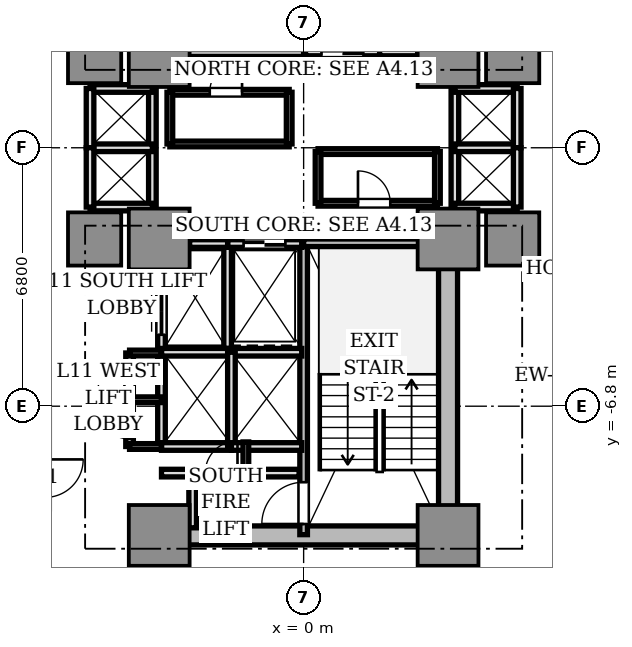
"""IFC4 building model, lengths in metres.
Left out: names, types, materials, properties, quantities, classifications, styles, units other than length and angle.
Written with IfcOpenShell. Run it as: python <this file> out.ifc"""

import sys

from ifc_helpers import new_model, si_unit, direction, frame, frame_2d, origin, origin_2d, place, context, subcontext, project, spatial, rectangle, extrude, source, transform, mapped, element, fill, save


model = new_model("IFC4")
c1 = context("Model", 3, precision=1e-05, world=origin(), true_north=direction((0.0, 1.0)))
c2 = subcontext(c1, "Body", "Model", "MODEL_VIEW")
j1 = project(units=[si_unit("LENGTHUNIT", "METRE"), si_unit("PLANEANGLEUNIT", "RADIAN")], contexts=[c1])
p1 = place(None, origin())
s1 = spatial("IfcSite", under=j1, at=p1, CompositionType="ELEMENT")
p2 = place(p1, origin())
s2 = spatial("IfcBuilding", under=s1, at=p2, CompositionType="ELEMENT")
p3 = place(p2, frame((0.0, 0.0, 43.2)))
s3 = spatial("IfcBuildingStorey", under=s2, at=p3, CompositionType="ELEMENT", Elevation=43.2)
p4 = place(p3, frame((-3.55, -10.2, 0.0), z_axis=(0.0, 0.0, 1.0), x_axis=(1.0, 0.0, 0.0)))
e1 = element("IfcWall", 1, at=p4, inside=s3, PredefinedType="SHEAR", context=c2, shape_type="SweptSolid", body=[
    extrude(rectangle(XDim=7.1, YDim=0.5, at=frame_2d((3.55, 0.0))), origin(), (0.0, 0.0, 1.0), 3.05),
])
p5 = place(p3, frame((3.8, -9.75, 0.0), z_axis=(0.0, 0.0, 1.0), x_axis=(0.0, 1.0, 0.0)))
e2 = element("IfcWall", 2, at=p5, inside=s3, PredefinedType="SHEAR", context=c2, shape_type="SweptSolid", body=[
    extrude(rectangle(XDim=6.9, YDim=0.5, at=frame_2d((3.45, 0.0))), origin(), (0.0, 0.0, 1.0), 3.05),
])
m1 = source(origin(), c2, "Body", "SweptSolid", [
    extrude(rectangle(XDim=1.6, YDim=1.6, at=origin_2d()), origin(), (0.0, 0.0, 1.0), 3.05),
])
for number, where, z_axis, x_axis in (
    (3, (-3.8, 2.4, 0.0), (0.0, 0.0, 1.0), (1.0, 0.0, 0.0)),
    (4, (3.8, 2.4, 0.0), (0.0, 0.0, 1.0), (1.0, 0.0, 0.0)),
    (5, (-3.8, -2.4, 0.0), (0.0, 0.0, 1.0), (1.0, 0.0, 0.0)),
    (6, (3.8, -2.4, 0.0), (0.0, 0.0, 1.0), (1.0, 0.0, 0.0)),
    (7, (-3.8, -10.2, 0.0), (0.0, 0.0, 1.0), (1.0, 0.0, 0.0)),
    (8, (3.8, -10.2, 0.0), (0.0, 0.0, 1.0), (1.0, 0.0, 0.0)),
):
    element("IfcColumn", number, at=place(p3, frame(where, z_axis=z_axis, x_axis=x_axis)), inside=s3, PredefinedType="COLUMN", context=c2, shape_type="MappedRepresentation", body=[
        mapped(m1, transform((0.0, 0.0, 0.0), scale=1.0)),
    ])
m2 = source(origin(), c2, "Body", "SweptSolid", [
    extrude(rectangle(XDim=1.4, YDim=1.4, at=origin_2d()), origin(), (0.0, 0.0, 1.0), 3.05),
])
for number, where, z_axis, x_axis in (
    (9, (5.5, 2.4, 0.0), (0.0, 0.0, 1.0), (1.0, 0.0, 0.0)),
    (10, (-5.5, 2.4, 0.0), (0.0, 0.0, 1.0), (1.0, 0.0, 0.0)),
    (11, (5.5, -2.4, 0.0), (0.0, 0.0, 1.0), (1.0, 0.0, 0.0)),
    (12, (-5.5, -2.4, 0.0), (0.0, 0.0, 1.0), (1.0, 0.0, 0.0)),
):
    element("IfcColumn", number, at=place(p3, frame(where, z_axis=z_axis, x_axis=x_axis)), inside=s3, PredefinedType="COLUMN", context=c2, shape_type="MappedRepresentation", body=[
        mapped(m2, transform((0.0, 0.0, 0.0), scale=1.0)),
    ])
p6 = place(p3, frame((0.0, 2.5, 0.0), z_axis=(0.0, 0.0, 1.0), x_axis=(0.0, 1.0, 0.0)))
e13 = element("IfcWall", 13, at=p6, inside=s3, PredefinedType="SOLIDWALL", context=c2, shape_type="SweptSolid", body=[
    extrude(rectangle(XDim=7.68, YDim=0.2, at=frame_2d((3.84, 0.0))), origin(), (0.0, 0.0, 1.0), 3.05),
])
p7 = place(p6, frame((6.5, 0.0, 0.0)))
e14 = element("IfcOpeningElement", 14, at=p7, cuts=e13, PredefinedType="OPENING", context=c2, shape_type="SweptSolid", body=[
    extrude(rectangle(XDim=0.95, YDim=2.15, at=frame_2d((0.475, 1.075))), frame((0.0, 0.11, 0.0), z_axis=(0.0, -1.0, 0.0), x_axis=(1.0, 0.0, 0.0)), (0.0, 0.0, 1.0), 0.22),
])
p8 = place(p3, frame((-3.72, 2.5, 0.0), z_axis=(0.0, 0.0, 1.0), x_axis=(1.0, 0.0, 0.0)))
e15 = element("IfcWall", 15, at=p8, inside=s3, PredefinedType="SOLIDWALL", context=c2, shape_type="SweptSolid", body=[
    extrude(rectangle(XDim=3.72, YDim=0.2, at=frame_2d((1.86, 0.0))), origin(), (0.0, 0.0, 1.0), 3.05),
])
p9 = place(p3, frame((0.0, -10.18, 0.0), z_axis=(0.0, 0.0, 1.0), x_axis=(0.0, 1.0, 0.0)))
e16 = element("IfcWall", 16, at=p9, inside=s3, PredefinedType="SOLIDWALL", context=c2, shape_type="SweptSolid", body=[
    extrude(rectangle(XDim=7.68, YDim=0.2, at=frame_2d((3.84, 0.0))), origin(), (0.0, 0.0, 1.0), 3.05),
])
p10 = place(p9, frame((0.28, 0.0, 0.0)))
e17 = element("IfcOpeningElement", 17, at=p10, cuts=e16, PredefinedType="OPENING", context=c2, shape_type="SweptSolid", body=[
    extrude(rectangle(XDim=1.1, YDim=2.15, at=frame_2d((0.55, 1.075))), frame((0.0, 0.11, 0.0), z_axis=(0.0, -1.0, 0.0), x_axis=(1.0, 0.0, 0.0)), (0.0, 0.0, 1.0), 0.22),
])
p11 = place(p3, frame((0.0, -2.5, 0.0), z_axis=(0.0, 0.0, 1.0), x_axis=(1.0, 0.0, 0.0)))
e18 = element("IfcWall", 18, at=p11, inside=s3, PredefinedType="SOLIDWALL", context=c2, shape_type="SweptSolid", body=[
    extrude(rectangle(XDim=3.72, YDim=0.2, at=frame_2d((1.86, 0.0))), origin(), (0.0, 0.0, 1.0), 3.05),
])
p12 = place(p3, frame((2.0, 2.5, 0.0), z_axis=(0.0, 0.0, 1.0), x_axis=(0.0, 1.0, 0.0)))
e19 = element("IfcWall", 19, at=p12, inside=s3, PredefinedType="SOLIDWALL", context=c2, shape_type="SweptSolid", body=[
    extrude(rectangle(XDim=2.78, YDim=0.2, at=frame_2d((1.39, 0.0))), origin(), (0.0, 0.0, 1.0), 2.6),
])
p13 = place(p3, frame((0.05, 2.52, 0.0), z_axis=(0.0, 0.0, 1.0), x_axis=(1.0, 0.0, 0.0)))
e20 = element("IfcWall", 20, at=p13, inside=s3, PredefinedType="SOLIDWALL", context=c2, shape_type="SweptSolid", body=[
    extrude(rectangle(XDim=1.95, YDim=0.2, at=frame_2d((0.975, 0.0))), origin(), (0.0, 0.0, 1.0), 2.6),
])
p14 = place(p13, frame((0.42, 0.0, 0.0)))
e21 = element("IfcOpeningElement", 21, at=p14, cuts=e20, PredefinedType="OPENING", context=c2, shape_type="SweptSolid", body=[
    extrude(rectangle(XDim=1.1, YDim=2.2, at=frame_2d((0.55, 1.1))), frame((0.0, 0.11, 0.0), z_axis=(0.0, -1.0, 0.0), x_axis=(1.0, 0.0, 0.0)), (0.0, 0.0, 1.0), 0.22),
])
p15 = place(p3, frame((-2.0, -5.28, 0.0), z_axis=(0.0, 0.0, 1.0), x_axis=(0.0, 1.0, 0.0)))
e22 = element("IfcWall", 22, at=p15, inside=s3, PredefinedType="SOLIDWALL", context=c2, shape_type="SweptSolid", body=[
    extrude(rectangle(XDim=2.78, YDim=0.2, at=frame_2d((1.39, 0.0))), origin(), (0.0, 0.0, 1.0), 2.6),
])
p16 = place(p3, frame((-2.0, -2.52, 0.0), z_axis=(0.0, 0.0, 1.0), x_axis=(1.0, 0.0, 0.0)))
e23 = element("IfcWall", 23, at=p16, inside=s3, PredefinedType="SOLIDWALL", context=c2, shape_type="SweptSolid", body=[
    extrude(rectangle(XDim=1.95, YDim=0.2, at=frame_2d((0.975, 0.0))), origin(), (0.0, 0.0, 1.0), 2.6),
])
p17 = place(p16, frame((0.42, 0.0, 0.0)))
e24 = element("IfcOpeningElement", 24, at=p17, cuts=e23, PredefinedType="OPENING", context=c2, shape_type="SweptSolid", body=[
    extrude(rectangle(XDim=1.1, YDim=2.2, at=frame_2d((0.55, 1.1))), frame((0.0, 0.11, 0.0), z_axis=(0.0, -1.0, 0.0), x_axis=(1.0, 0.0, 0.0)), (0.0, 0.0, 1.0), 0.22),
])
for number, where, z_axis, x_axis in (
    (25, (2.0, 2.52, 0.0), (0.0, 0.0, 1.0), (1.0, 0.0, 0.0)),
    (26, (-3.0, -2.52, 0.0), (0.0, 0.0, 1.0), (1.0, 0.0, 0.0)),
):
    element("IfcWall", number, at=place(p3, frame(where, z_axis=z_axis, x_axis=x_axis)), inside=s3, PredefinedType="SOLIDWALL", context=c2, shape_type="SweptSolid", body=[
        extrude(rectangle(XDim=1.0, YDim=0.2, at=frame_2d((0.5, 0.0))), origin(), (0.0, 0.0, 1.0), 2.6),
    ])
p18 = place(p3, frame((-3.74, -5.36, 0.0), z_axis=(0.0, 0.0, 1.0), x_axis=(0.0, 1.0, 0.0)))
e27 = element("IfcWall", 27, at=p18, inside=s3, PredefinedType="SOLIDWALL", context=c2, shape_type="SweptSolid", body=[
    extrude(rectangle(XDim=2.08, YDim=0.2, at=frame_2d((1.04, 0.0))), origin(), (0.0, 0.0, 1.0), 2.6),
])
p19 = place(p18, frame((0.44, 0.0, 0.0)))
e28 = element("IfcOpeningElement", 28, at=p19, cuts=e27, PredefinedType="OPENING", context=c2, shape_type="SweptSolid", body=[
    extrude(rectangle(XDim=1.2, YDim=2.2, at=frame_2d((0.6, 1.1))), frame((0.0, 0.11, 0.0), z_axis=(0.0, -1.0, 0.0), x_axis=(1.0, 0.0, 0.0)), (0.0, 0.0, 1.0), 0.22),
])
p20 = place(p3, frame((-3.74, -7.86, 0.0), z_axis=(0.0, 0.0, 1.0), x_axis=(0.0, 1.0, 0.0)))
e29 = element("IfcWall", 29, at=p20, inside=s3, PredefinedType="SOLIDWALL", context=c2, shape_type="SweptSolid", body=[
    extrude(rectangle(XDim=2.48, YDim=0.2, at=frame_2d((1.24, 0.0))), origin(), (0.0, 0.0, 1.0), 2.6),
])
p21 = place(p3, frame((-3.74, -7.86, 0.0), z_axis=(0.0, 0.0, 1.0), x_axis=(1.0, 0.0, 0.0)))
e30 = element("IfcWall", 30, at=p21, inside=s3, PredefinedType="SOLIDWALL", context=c2, shape_type="SweptSolid", body=[
    extrude(rectangle(XDim=1.84, YDim=0.2, at=frame_2d((0.92, 0.0))), origin(), (0.0, 0.0, 1.0), 2.6),
])
p22 = place(p3, frame((-3.74, -5.38, 0.0), z_axis=(0.0, 0.0, 1.0), x_axis=(1.0, 0.0, 0.0)))
e31 = element("IfcWall", 31, at=p22, inside=s3, PredefinedType="SOLIDWALL", context=c2, shape_type="SweptSolid", body=[
    extrude(rectangle(XDim=3.69, YDim=0.2, at=frame_2d((1.845, 0.0))), origin(), (0.0, 0.0, 1.0), 2.6),
])
p23 = place(p3, frame((-1.9, -7.86, 0.0), z_axis=(0.0, 0.0, 1.0), x_axis=(0.0, 1.0, 0.0)))
e32 = element("IfcWall", 32, at=p23, inside=s3, PredefinedType="SOLIDWALL", context=c2, shape_type="SweptSolid", body=[
    extrude(rectangle(XDim=2.48, YDim=0.2, at=frame_2d((1.24, 0.0))), origin(), (0.0, 0.0, 1.0), 2.6),
])
p24 = place(p3, frame((-1.9, -7.86, 0.0), z_axis=(0.0, 0.0, 1.0), x_axis=(1.0, 0.0, 0.0)))
e33 = element("IfcWall", 33, at=p24, inside=s3, PredefinedType="SOLIDWALL", context=c2, shape_type="SweptSolid", body=[
    extrude(rectangle(XDim=1.85, YDim=0.2, at=frame_2d((0.925, 0.0))), origin(), (0.0, 0.0, 1.0), 2.6),
])
p25 = place(p3, frame((3.98, -1.56, 0.0), z_axis=(0.0, 0.0, 1.0), x_axis=(0.0, 1.0, 0.0)))
e34 = element("IfcWall", 34, at=p25, inside=s3, PredefinedType="SOLIDWALL", context=c2, shape_type="SweptSolid", body=[
    extrude(rectangle(XDim=3.12, YDim=0.2, at=frame_2d((1.56, 0.0))), origin(), (0.0, 0.0, 1.0), 2.12),
])
for number, where, z_axis, x_axis in (
    (35, (3.98, 1.56, 0.0), (0.0, 0.0, 1.0), (1.0, 0.0, 0.0)),
    (36, (3.98, -1.56, 0.0), (0.0, 0.0, 1.0), (1.0, 0.0, 0.0)),
    (37, (3.98, 0.0, 0.0), (0.0, 0.0, 1.0), (1.0, 0.0, 0.0)),
):
    element("IfcWall", number, at=place(p3, frame(where, z_axis=z_axis, x_axis=x_axis)), inside=s3, PredefinedType="SOLIDWALL", context=c2, shape_type="SweptSolid", body=[
        extrude(rectangle(XDim=1.64, YDim=0.2, at=frame_2d((0.82, 0.0))), origin(), (0.0, 0.0, 1.0), 2.6),
    ])
for number, where, z_axis, x_axis in (
    (38, (5.62, 0.0, 0.0), (0.0, 0.0, 1.0), (0.0, 1.0, 0.0)),
    (39, (5.62, -1.56, 0.0), (0.0, 0.0, 1.0), (0.0, 1.0, 0.0)),
):
    element("IfcWall", number, at=place(p3, frame(where, z_axis=z_axis, x_axis=x_axis)), inside=s3, PredefinedType="SOLIDWALL", context=c2, shape_type="SweptSolid", body=[
        extrude(rectangle(XDim=1.56, YDim=0.2, at=frame_2d((0.78, 0.0))), origin(), (0.0, 0.0, 1.0), 2.6),
    ])
p26 = place(p3, frame((-3.98, -1.56, 0.0), z_axis=(0.0, 0.0, 1.0), x_axis=(0.0, 1.0, 0.0)))
e40 = element("IfcWall", 40, at=p26, inside=s3, PredefinedType="SOLIDWALL", context=c2, shape_type="SweptSolid", body=[
    extrude(rectangle(XDim=3.12, YDim=0.2, at=frame_2d((1.56, 0.0))), origin(), (0.0, 0.0, 1.0), 2.12),
])
for number, where, z_axis, x_axis in (
    (41, (-5.62, 1.56, 0.0), (0.0, 0.0, 1.0), (1.0, 0.0, 0.0)),
    (42, (-5.62, -1.56, 0.0), (0.0, 0.0, 1.0), (1.0, 0.0, 0.0)),
    (43, (-5.62, 0.0, 0.0), (0.0, 0.0, 1.0), (1.0, 0.0, 0.0)),
):
    element("IfcWall", number, at=place(p3, frame(where, z_axis=z_axis, x_axis=x_axis)), inside=s3, PredefinedType="SOLIDWALL", context=c2, shape_type="SweptSolid", body=[
        extrude(rectangle(XDim=1.64, YDim=0.2, at=frame_2d((0.82, 0.0))), origin(), (0.0, 0.0, 1.0), 2.6),
    ])
for number, where, z_axis, x_axis in (
    (44, (-5.62, 0.0, 0.0), (0.0, 0.0, 1.0), (0.0, 1.0, 0.0)),
    (45, (-5.62, -1.56, 0.0), (0.0, 0.0, 1.0), (0.0, 1.0, 0.0)),
):
    element("IfcWall", number, at=place(p3, frame(where, z_axis=z_axis, x_axis=x_axis)), inside=s3, PredefinedType="SOLIDWALL", context=c2, shape_type="SweptSolid", body=[
        extrude(rectangle(XDim=1.56, YDim=0.2, at=frame_2d((0.78, 0.0))), origin(), (0.0, 0.0, 1.0), 2.6),
    ])
p27 = place(p3, frame((-3.74, -8.56, 0.0), z_axis=(0.0, 0.0, 1.0), x_axis=(1.0, 0.0, 0.0)))
e46 = element("IfcWall", 46, at=p27, inside=s3, PredefinedType="SOLIDWALL", context=c2, shape_type="SweptSolid", body=[
    extrude(rectangle(XDim=3.62, YDim=0.2, at=frame_2d((1.81, 0.0))), origin(), (0.0, 0.0, 1.0), 2.6),
])
p28 = place(p27, frame((1.15, 0.0, 0.0)))
e47 = element("IfcOpeningElement", 47, at=p28, cuts=e46, PredefinedType="OPENING", context=c2, shape_type="SweptSolid", body=[
    extrude(rectangle(XDim=0.85, YDim=2.1, at=frame_2d((0.425, 1.05))), frame((0.0, 0.11, 0.0), z_axis=(0.0, -1.0, 0.0), x_axis=(1.0, 0.0, 0.0)), (0.0, 0.0, 1.0), 0.22),
])
p29 = place(p3, frame((-2.92, -10.0, 0.0), z_axis=(0.0, 0.0, 1.0), x_axis=(0.0, 1.0, 0.0)))
e48 = element("IfcWall", 48, at=p29, inside=s3, PredefinedType="SOLIDWALL", context=c2, shape_type="SweptSolid", body=[
    extrude(rectangle(XDim=1.44, YDim=0.2, at=frame_2d((0.72, 0.0))), origin(), (0.0, 0.0, 1.0), 2.6),
])
p30 = place(p3, frame((-1.52, -8.56, 0.0), z_axis=(0.0, 0.0, 1.0), x_axis=(0.0, 1.0, 0.0)))
e49 = element("IfcWall", 49, at=p30, inside=s3, PredefinedType="PARTITIONING", context=c2, shape_type="SweptSolid", body=[
    extrude(rectangle(XDim=0.82, YDim=0.15, at=frame_2d((0.41, 0.0))), origin(), (0.0, 0.0, 1.0), 2.6),
])
p31 = place(p3, frame((-4.58, -7.86, 0.0), z_axis=(0.0, 0.0, 1.0), x_axis=(0.0, 1.0, 0.0)))
e50 = element("IfcWall", 50, at=p31, inside=s3, PredefinedType="SOLIDWALL", context=c2, shape_type="SweptSolid", body=[
    extrude(rectangle(XDim=2.46, YDim=0.2, at=frame_2d((1.23, 0.0))), origin(), (0.0, 0.0, 1.0), 2.6),
])
p32 = place(p31, frame((0.2, 0.0, 0.0)))
e51 = element("IfcOpeningElement", 51, at=p32, cuts=e50, PredefinedType="OPENING", context=c2, shape_type="SweptSolid", body=[
    extrude(rectangle(XDim=0.85, YDim=2.1, at=frame_2d((0.425, 1.05))), frame((0.0, 0.11, 0.0), z_axis=(0.0, -1.0, 0.0), x_axis=(1.0, 0.0, 0.0)), (0.0, 0.0, 1.0), 0.22),
])
p33 = place(p31, frame((1.38, 0.0, 0.0)))
e52 = element("IfcOpeningElement", 52, at=p33, cuts=e50, PredefinedType="OPENING", context=c2, shape_type="SweptSolid", body=[
    extrude(rectangle(XDim=0.85, YDim=2.1, at=frame_2d((0.425, 1.05))), frame((0.0, 0.11, 0.0), z_axis=(0.0, -1.0, 0.0), x_axis=(1.0, 0.0, 0.0)), (0.0, 0.0, 1.0), 0.22),
])
for number, where, z_axis, x_axis in (
    (53, (-4.58, -5.4, 0.0), (0.0, 0.0, 1.0), (1.0, 0.0, 0.0)),
    (54, (-4.58, -7.86, 0.0), (0.0, 0.0, 1.0), (1.0, 0.0, 0.0)),
    (55, (-4.58, -6.63, 0.0), (0.0, 0.0, 1.0), (1.0, 0.0, 0.0)),
):
    element("IfcWall", number, at=place(p3, frame(where, z_axis=z_axis, x_axis=x_axis)), inside=s3, PredefinedType="PARTITIONING", context=c2, shape_type="SweptSolid", body=[
        extrude(rectangle(XDim=0.84, YDim=0.15, at=frame_2d((0.42, 0.0))), origin(), (0.0, 0.0, 1.0), 2.6),
    ])
p34 = place(p3, frame((-3.52, 0.1, 0.0), z_axis=(0.0, 0.0, 1.0), x_axis=(1.0, 0.0, 0.0)))
e56 = element("IfcWall", 56, at=p34, inside=s3, PredefinedType="PARTITIONING", context=c2, shape_type="SweptSolid", body=[
    extrude(rectangle(XDim=3.14, YDim=0.15, at=frame_2d((1.57, 0.0))), origin(), (0.0, 0.0, 1.0), 2.6),
])
p35 = place(p3, frame((-3.52, 1.46, 0.0), z_axis=(0.0, 0.0, 1.0), x_axis=(1.0, 0.0, 0.0)))
e57 = element("IfcWall", 57, at=p35, inside=s3, PredefinedType="PARTITIONING", context=c2, shape_type="SweptSolid", body=[
    extrude(rectangle(XDim=3.14, YDim=0.15, at=frame_2d((1.57, 0.0))), origin(), (0.0, 0.0, 1.0), 2.6),
])
p36 = place(p35, frame((1.05, 0.0, 0.0)))
e58 = element("IfcOpeningElement", 58, at=p36, cuts=e57, PredefinedType="OPENING", context=c2, shape_type="SweptSolid", body=[
    extrude(rectangle(XDim=0.85, YDim=2.1, at=frame_2d((0.425, 1.05))), frame((0.0, 0.085, 0.0), z_axis=(0.0, -1.0, 0.0), x_axis=(1.0, 0.0, 0.0)), (0.0, 0.0, 1.0), 0.17),
])
p37 = place(p3, frame((-3.52, 0.1, 0.0), z_axis=(0.0, 0.0, 1.0), x_axis=(0.0, 1.0, 0.0)))
e59 = element("IfcWall", 59, at=p37, inside=s3, PredefinedType="PARTITIONING", context=c2, shape_type="SweptSolid", body=[
    extrude(rectangle(XDim=1.36, YDim=0.15, at=frame_2d((0.68, 0.0))), origin(), (0.0, 0.0, 1.0), 2.12),
])
p38 = place(p3, frame((-0.38, 0.1, 0.0), z_axis=(0.0, 0.0, 1.0), x_axis=(0.0, 1.0, 0.0)))
e60 = element("IfcWall", 60, at=p38, inside=s3, PredefinedType="PARTITIONING", context=c2, shape_type="SweptSolid", body=[
    extrude(rectangle(XDim=1.36, YDim=0.15, at=frame_2d((0.68, 0.0))), origin(), (0.0, 0.0, 1.0), 2.6),
])
p39 = place(p3, frame((0.38, -0.1, 0.0), z_axis=(0.0, 0.0, 1.0), x_axis=(1.0, 0.0, 0.0)))
e61 = element("IfcWall", 61, at=p39, inside=s3, PredefinedType="PARTITIONING", context=c2, shape_type="SweptSolid", body=[
    extrude(rectangle(XDim=3.14, YDim=0.15, at=frame_2d((1.57, 0.0))), origin(), (0.0, 0.0, 1.0), 2.6),
])
p40 = place(p3, frame((0.38, -1.46, 0.0), z_axis=(0.0, 0.0, 1.0), x_axis=(1.0, 0.0, 0.0)))
e62 = element("IfcWall", 62, at=p40, inside=s3, PredefinedType="PARTITIONING", context=c2, shape_type="SweptSolid", body=[
    extrude(rectangle(XDim=3.14, YDim=0.15, at=frame_2d((1.57, 0.0))), origin(), (0.0, 0.0, 1.0), 2.6),
])
p41 = place(p40, frame((1.05, 0.0, 0.0)))
e63 = element("IfcOpeningElement", 63, at=p41, cuts=e62, PredefinedType="OPENING", context=c2, shape_type="SweptSolid", body=[
    extrude(rectangle(XDim=0.85, YDim=2.1, at=frame_2d((0.425, 1.05))), frame((0.0, 0.085, 0.0), z_axis=(0.0, -1.0, 0.0), x_axis=(1.0, 0.0, 0.0)), (0.0, 0.0, 1.0), 0.17),
])
p42 = place(p3, frame((0.38, -1.46, 0.0), z_axis=(0.0, 0.0, 1.0), x_axis=(0.0, 1.0, 0.0)))
e64 = element("IfcWall", 64, at=p42, inside=s3, PredefinedType="PARTITIONING", context=c2, shape_type="SweptSolid", body=[
    extrude(rectangle(XDim=1.36, YDim=0.15, at=frame_2d((0.68, 0.0))), origin(), (0.0, 0.0, 1.0), 2.6),
])
p43 = place(p3, frame((3.52, -1.46, 0.0), z_axis=(0.0, 0.0, 1.0), x_axis=(0.0, 1.0, 0.0)))
e65 = element("IfcWall", 65, at=p43, inside=s3, PredefinedType="PARTITIONING", context=c2, shape_type="SweptSolid", body=[
    extrude(rectangle(XDim=1.36, YDim=0.15, at=frame_2d((0.68, 0.0))), origin(), (0.0, 0.0, 1.0), 2.12),
])
m3 = source(origin(), c2, "Body", "SweptSolid", [
    extrude(rectangle(XDim=1.1, YDim=0.05, at=origin_2d()), origin(), (0.0, 0.0, 1.0), 2.2),
])
p44 = place(p14, frame((0.55, 0.0, 0.0)))
e66 = element("IfcDoor", 66, at=p44, inside=s3, OperationType="DOUBLE_DOOR_SLIDING", PredefinedType="DOOR", context=c2, shape_type="MappedRepresentation", body=[
    mapped(m3, transform((0.0, 0.0, 0.0), scale=1.0)),
])
fill(e21, e66)
p45 = place(p17, frame((0.55, 0.0, 0.0)))
e67 = element("IfcDoor", 67, at=p45, inside=s3, OperationType="DOUBLE_DOOR_SLIDING", PredefinedType="DOOR", context=c2, shape_type="MappedRepresentation", body=[
    mapped(m3, transform((0.0, 0.0, 0.0), scale=1.0)),
])
fill(e24, e67)
m4 = source(origin(), c2, "Body", "SweptSolid", [
    extrude(rectangle(XDim=1.2, YDim=0.05, at=origin_2d()), origin(), (0.0, 0.0, 1.0), 2.2),
])
p46 = place(p19, frame((0.6, 0.0, 0.0)))
e68 = element("IfcDoor", 68, at=p46, inside=s3, OperationType="DOUBLE_DOOR_SLIDING", PredefinedType="DOOR", context=c2, shape_type="MappedRepresentation", body=[
    mapped(m4, transform((0.0, 0.0, 0.0), scale=1.0)),
])
fill(e28, e68)
m5 = source(origin(), c2, "Body", "SweptSolid", [
    extrude(rectangle(XDim=1.1, YDim=0.05, at=origin_2d()), origin(), (0.0, 0.0, 1.0), 2.15),
])
p47 = place(p10, frame((0.55, 0.0, 0.0)))
e69 = element("IfcDoor", 69, at=p47, inside=s3, OperationType="SINGLE_SWING_LEFT", PredefinedType="DOOR", context=c2, shape_type="MappedRepresentation", body=[
    mapped(m5, transform((0.0, 0.0, 0.0), scale=1.0)),
])
fill(e17, e69)
m6 = source(origin(), c2, "Body", "SweptSolid", [
    extrude(rectangle(XDim=0.85, YDim=0.05, at=origin_2d()), origin(), (0.0, 0.0, 1.0), 2.1),
])
p48 = place(p28, frame((0.425, 0.0, 0.0)))
e70 = element("IfcDoor", 70, at=p48, inside=s3, OperationType="SINGLE_SWING_RIGHT", PredefinedType="DOOR", context=c2, shape_type="MappedRepresentation", body=[
    mapped(m6, transform((0.0, 0.0, 0.0), scale=1.0)),
])
fill(e47, e70)
p49 = place(p32, frame((0.425, 0.0, 0.0)))
e71 = element("IfcDoor", 71, at=p49, inside=s3, OperationType="SINGLE_SWING_RIGHT", PredefinedType="DOOR", context=c2, shape_type="MappedRepresentation", body=[
    mapped(m6, transform((0.0, 0.0, 0.0), scale=1.0)),
])
fill(e51, e71)
p50 = place(p33, frame((0.425, 0.0, 0.0)))
e72 = element("IfcDoor", 72, at=p50, inside=s3, OperationType="SINGLE_SWING_LEFT", PredefinedType="DOOR", context=c2, shape_type="MappedRepresentation", body=[
    mapped(m6, transform((0.0, 0.0, 0.0), scale=1.0)),
])
fill(e52, e72)
p51 = place(p36, frame((0.425, 0.0, 0.0)))
e73 = element("IfcDoor", 73, at=p51, inside=s3, OperationType="SINGLE_SWING_RIGHT", PredefinedType="DOOR", context=c2, shape_type="MappedRepresentation", body=[
    mapped(m6, transform((0.0, 0.0, 0.0), scale=1.0)),
])
fill(e58, e73)
p52 = place(p41, frame((0.425, 0.0, 0.0)))
e74 = element("IfcDoor", 74, at=p52, inside=s3, OperationType="SINGLE_SWING_LEFT", PredefinedType="DOOR", context=c2, shape_type="MappedRepresentation", body=[
    mapped(m6, transform((0.0, 0.0, 0.0), scale=1.0)),
])
fill(e63, e74)
save(model, sys.argv[1])
